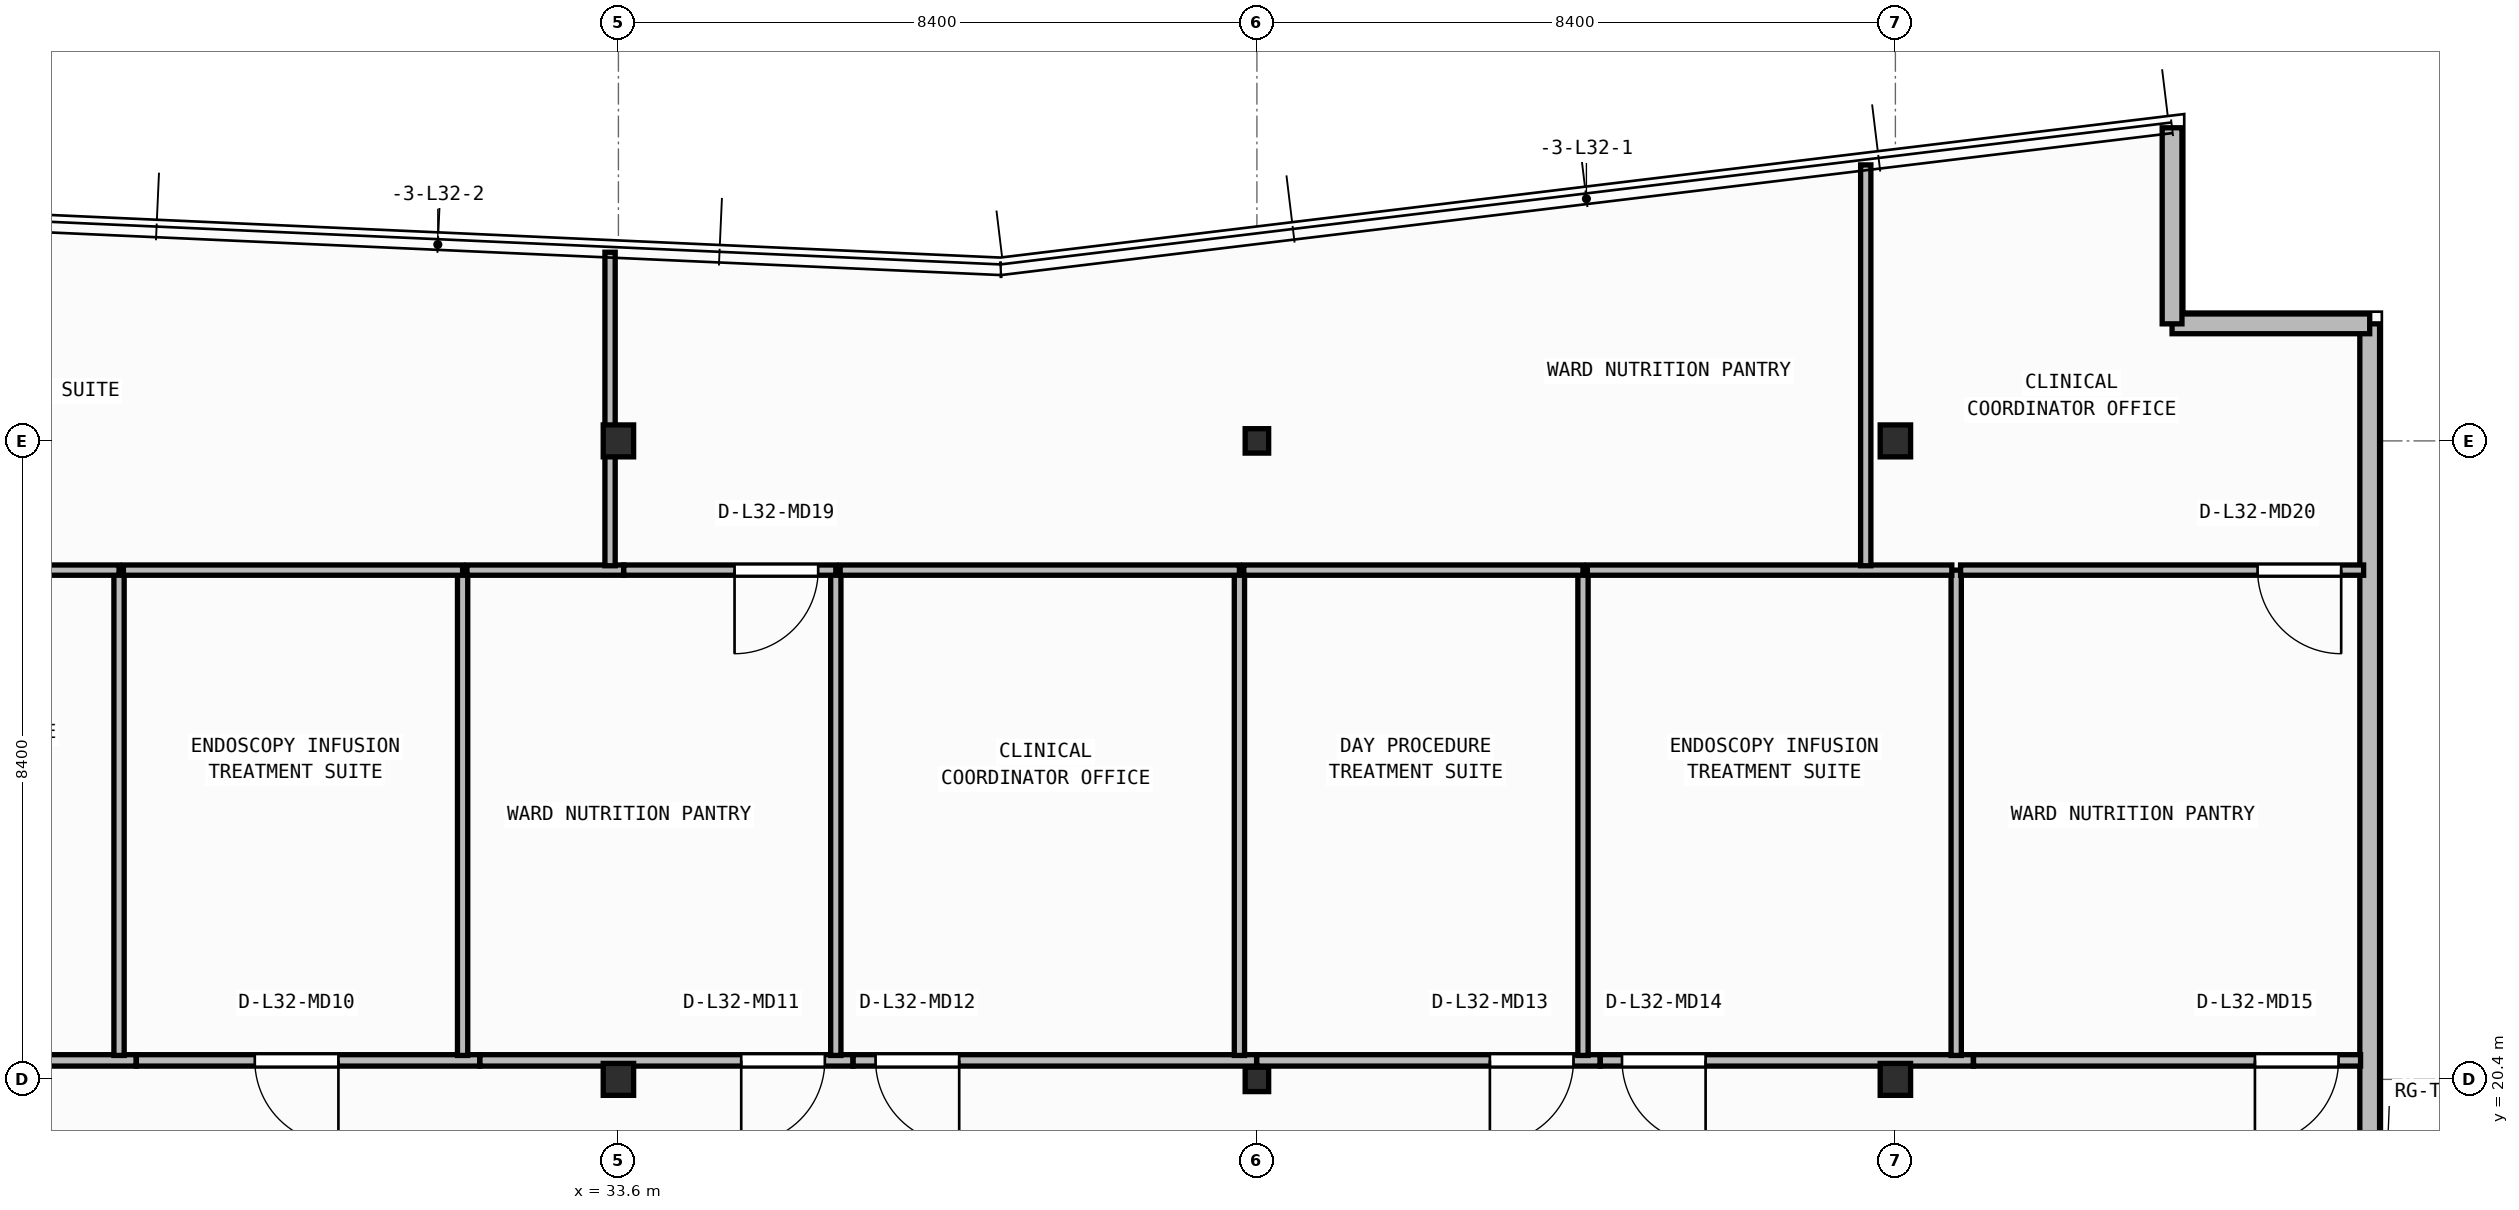
"""IFC4 building model, lengths in metres.
Left out: names, types, materials, properties, quantities, classifications, styles, units other than length and angle.
Written with IfcOpenShell. Run it as: python <this file> out.ifc"""

import sys

from ifc_helpers import new_model, si_unit, direction, frame, frame_2d, origin, origin_2d, place, context, subcontext, project, spatial, rectangle, i_section, extrude, element, fill, save


model = new_model("IFC4")
c1 = context("Model", 3, precision=1e-05, world=origin(), true_north=direction((0.0, 1.0)))
c2 = subcontext(c1, "Body", "Model", "MODEL_VIEW")
j1 = project(units=[si_unit("LENGTHUNIT", "METRE"), si_unit("PLANEANGLEUNIT", "RADIAN")], contexts=[c1])
p1 = place(None, origin())
s1 = spatial("IfcSite", under=j1, at=p1, CompositionType="ELEMENT")
p2 = place(p1, origin())
s2 = spatial("IfcBuilding", under=s1, at=p2, CompositionType="ELEMENT")
p3 = place(p2, frame((0.0, 0.0, 131.0)))
s3 = spatial("IfcBuildingStorey", under=s2, at=p3, CompositionType="ELEMENT", Elevation=131.0)
p4 = place(p3, frame((33.6, 20.4, 0.0), z_axis=(0.0, 0.0, 1.0), x_axis=(1.0, 0.0, 0.0)))
e1 = element("IfcColumn", 1, at=p4, inside=s3, PredefinedType="COLUMN", context=c2, shape_type="SweptSolid", body=[
    extrude(i_section(OverallWidth=0.4, OverallDepth=0.42, WebThickness=0.025, FlangeThickness=0.04, at=origin_2d()), origin(), (0.0, 0.0, 1.0), 3.95),
])
p5 = place(p3, frame((42.0, 20.4, 0.0), z_axis=(0.0, 0.0, 1.0), x_axis=(1.0, 0.0, 0.0)))
e2 = element("IfcColumn", 2, at=p5, inside=s3, PredefinedType="COLUMN", context=c2, shape_type="SweptSolid", body=[
    extrude(i_section(OverallWidth=0.309, OverallDepth=0.321, WebThickness=0.014, FlangeThickness=0.022, FilletRadius=0.017, at=origin_2d()), origin(), (0.0, 0.0, 1.0), 3.95),
])
for number, where, z_axis, x_axis in (
    (3, (50.4, 20.4, 0.0), (0.0, 0.0, 1.0), (1.0, 0.0, 0.0)),
    (4, (33.6, 28.8, 0.0), (0.0, 0.0, 1.0), (1.0, 0.0, 0.0)),
):
    element("IfcColumn", number, at=place(p3, frame(where, z_axis=z_axis, x_axis=x_axis)), inside=s3, PredefinedType="COLUMN", context=c2, shape_type="SweptSolid", body=[
        extrude(i_section(OverallWidth=0.4, OverallDepth=0.42, WebThickness=0.025, FlangeThickness=0.04, at=origin_2d()), origin(), (0.0, 0.0, 1.0), 3.95),
    ])
p6 = place(p3, frame((42.0, 28.8, 0.0), z_axis=(0.0, 0.0, 1.0), x_axis=(1.0, 0.0, 0.0)))
e5 = element("IfcColumn", 5, at=p6, inside=s3, PredefinedType="COLUMN", context=c2, shape_type="SweptSolid", body=[
    extrude(i_section(OverallWidth=0.309, OverallDepth=0.321, WebThickness=0.014, FlangeThickness=0.022, FilletRadius=0.017, at=origin_2d()), origin(), (0.0, 0.0, 1.0), 3.95),
])
p7 = place(p3, frame((50.4, 28.8, 0.0), z_axis=(0.0, 0.0, 1.0), x_axis=(1.0, 0.0, 0.0)))
e6 = element("IfcColumn", 6, at=p7, inside=s3, PredefinedType="COLUMN", context=c2, shape_type="SweptSolid", body=[
    extrude(i_section(OverallWidth=0.4, OverallDepth=0.42, WebThickness=0.025, FlangeThickness=0.04, at=origin_2d()), origin(), (0.0, 0.0, 1.0), 3.95),
])
p8 = place(p3, frame((56.64, 6.86, 0.0), z_axis=(0.0, 0.0, 1.0), x_axis=(0.0, 1.0, 0.0)))
e7 = element("IfcWall", 7, at=p8, inside=s3, PredefinedType="STANDARD", context=c2, shape_type="SweptSolid", body=[
    extrude(rectangle(XDim=23.48, YDim=0.26, at=frame_2d((11.74, 0.0))), origin(), (0.0, 0.0, 1.0), 3.71),
])
p9 = place(p8, frame((9.24, 0.0, 0.0)))
e8 = element("IfcOpeningElement", 8, at=p9, cuts=e7, PredefinedType="OPENING", context=c2, shape_type="SweptSolid", body=[
    extrude(rectangle(XDim=1.3, YDim=2.15, at=frame_2d((0.65, 1.075))), frame((0.0, 0.14, 0.0), z_axis=(0.0, -1.0, 0.0), x_axis=(1.0, 0.0, 0.0)), (0.0, 0.0, 1.0), 0.28),
])
p10 = place(p3, frame((56.64, 30.34, 0.0), z_axis=(0.0, 0.0, 1.0), x_axis=(-1.0, 0.0, 0.0)))
e9 = element("IfcWall", 9, at=p10, inside=s3, PredefinedType="STANDARD", context=c2, shape_type="SweptSolid", body=[
    extrude(rectangle(XDim=2.6, YDim=0.26, at=frame_2d((1.3, 0.0))), origin(), (0.0, 0.0, 1.0), 3.71),
])
p11 = place(p3, frame((54.04, 30.34, 0.0), z_axis=(0.0, 0.0, 1.0), x_axis=(0.0, 1.0, 0.0)))
e10 = element("IfcWall", 10, at=p11, inside=s3, PredefinedType="STANDARD", context=c2, shape_type="SweptSolid", body=[
    extrude(rectangle(XDim=2.579, YDim=0.26, at=frame_2d((1.29, 0.0))), origin(), (0.0, 0.0, 1.0), 3.71),
])
p12 = place(p3, frame((27.256, 20.65, 0.0), z_axis=(0.0, 0.0, 1.0), x_axis=(-1.0, 0.0, 0.0)))
e11 = element("IfcWall", 11, at=p12, inside=s3, PredefinedType="PARTITIONING", context=c2, shape_type="SweptSolid", body=[
    extrude(rectangle(XDim=5.536, YDim=0.15, at=frame_2d((2.768, 0.0))), origin(), (0.0, 0.0, 1.0), 3.083),
])
p13 = place(p3, frame((31.776, 20.65, 0.0), z_axis=(0.0, 0.0, 1.0), x_axis=(-1.0, 0.0, 0.0)))
e12 = element("IfcWall", 12, at=p13, inside=s3, PredefinedType="PARTITIONING", context=c2, shape_type="SweptSolid", body=[
    extrude(rectangle(XDim=4.518, YDim=0.15, at=frame_2d((2.259, 0.0))), origin(), (0.0, 0.0, 1.0), 3.083),
])
p14 = place(p13, frame((1.86, 0.0, 0.0)))
e13 = element("IfcOpeningElement", 13, at=p14, cuts=e12, PredefinedType="OPENING", context=c2, shape_type="SweptSolid", body=[
    extrude(rectangle(XDim=1.1, YDim=2.1, at=frame_2d((0.55, 1.05))), frame((0.0, 0.085, 0.0), z_axis=(0.0, -1.0, 0.0), x_axis=(1.0, 0.0, 0.0)), (0.0, 0.0, 1.0), 0.17),
])
p15 = place(p3, frame((36.686, 20.65, 0.0), z_axis=(0.0, 0.0, 1.0), x_axis=(-1.0, 0.0, 0.0)))
e14 = element("IfcWall", 14, at=p15, inside=s3, PredefinedType="PARTITIONING", context=c2, shape_type="SweptSolid", body=[
    extrude(rectangle(XDim=4.908, YDim=0.15, at=frame_2d((2.454, 0.0))), origin(), (0.0, 0.0, 1.0), 3.083),
])
p16 = place(p15, frame((0.37, 0.0, 0.0)))
e15 = element("IfcOpeningElement", 15, at=p16, cuts=e14, PredefinedType="OPENING", context=c2, shape_type="SweptSolid", body=[
    extrude(rectangle(XDim=1.1, YDim=2.1, at=frame_2d((0.55, 1.05))), frame((0.0, 0.085, 0.0), z_axis=(0.0, -1.0, 0.0), x_axis=(1.0, 0.0, 0.0)), (0.0, 0.0, 1.0), 0.17),
])
p17 = place(p3, frame((41.996, 20.65, 0.0), z_axis=(0.0, 0.0, 1.0), x_axis=(-1.0, 0.0, 0.0)))
e16 = element("IfcWall", 16, at=p17, inside=s3, PredefinedType="PARTITIONING", context=c2, shape_type="SweptSolid", body=[
    extrude(rectangle(XDim=5.308, YDim=0.15, at=frame_2d((2.654, 0.0))), origin(), (0.0, 0.0, 1.0), 3.083),
])
p18 = place(p17, frame((3.913, 0.0, 0.0)))
e17 = element("IfcOpeningElement", 17, at=p18, cuts=e16, PredefinedType="OPENING", context=c2, shape_type="SweptSolid", body=[
    extrude(rectangle(XDim=1.1, YDim=2.1, at=frame_2d((0.55, 1.05))), frame((0.0, 0.085, 0.0), z_axis=(0.0, -1.0, 0.0), x_axis=(1.0, 0.0, 0.0)), (0.0, 0.0, 1.0), 0.17),
])
p19 = place(p3, frame((46.516, 20.65, 0.0), z_axis=(0.0, 0.0, 1.0), x_axis=(-1.0, 0.0, 0.0)))
e18 = element("IfcWall", 18, at=p19, inside=s3, PredefinedType="PARTITIONING", context=c2, shape_type="SweptSolid", body=[
    extrude(rectangle(XDim=4.518, YDim=0.15, at=frame_2d((2.259, 0.0))), origin(), (0.0, 0.0, 1.0), 3.083),
])
p20 = place(p19, frame((0.351, 0.0, 0.0)))
e19 = element("IfcOpeningElement", 19, at=p20, cuts=e18, PredefinedType="OPENING", context=c2, shape_type="SweptSolid", body=[
    extrude(rectangle(XDim=1.1, YDim=2.1, at=frame_2d((0.55, 1.05))), frame((0.0, 0.085, 0.0), z_axis=(0.0, -1.0, 0.0), x_axis=(1.0, 0.0, 0.0)), (0.0, 0.0, 1.0), 0.17),
])
p21 = place(p3, frame((51.426, 20.65, 0.0), z_axis=(0.0, 0.0, 1.0), x_axis=(-1.0, 0.0, 0.0)))
e20 = element("IfcWall", 20, at=p21, inside=s3, PredefinedType="PARTITIONING", context=c2, shape_type="SweptSolid", body=[
    extrude(rectangle(XDim=4.908, YDim=0.15, at=frame_2d((2.454, 0.0))), origin(), (0.0, 0.0, 1.0), 3.083),
])
p22 = place(p21, frame((3.523, 0.0, 0.0)))
e21 = element("IfcOpeningElement", 21, at=p22, cuts=e20, PredefinedType="OPENING", context=c2, shape_type="SweptSolid", body=[
    extrude(rectangle(XDim=1.1, YDim=2.1, at=frame_2d((0.55, 1.05))), frame((0.0, 0.085, 0.0), z_axis=(0.0, -1.0, 0.0), x_axis=(1.0, 0.0, 0.0)), (0.0, 0.0, 1.0), 0.17),
])
p23 = place(p3, frame((56.52, 20.65, 0.0), z_axis=(0.0, 0.0, 1.0), x_axis=(-1.0, 0.0, 0.0)))
e22 = element("IfcWall", 22, at=p23, inside=s3, PredefinedType="PARTITIONING", context=c2, shape_type="SweptSolid", body=[
    extrude(rectangle(XDim=5.092, YDim=0.15, at=frame_2d((2.546, 0.0))), origin(), (0.0, 0.0, 1.0), 3.71),
])
p24 = place(p23, frame((0.29, 0.0, 0.0)))
e23 = element("IfcOpeningElement", 23, at=p24, cuts=e22, PredefinedType="OPENING", context=c2, shape_type="SweptSolid", body=[
    extrude(rectangle(XDim=1.1, YDim=2.1, at=frame_2d((0.55, 1.05))), frame((0.0, 0.085, 0.0), z_axis=(0.0, -1.0, 0.0), x_axis=(1.0, 0.0, 0.0)), (0.0, 0.0, 1.0), 0.17),
])
p25 = place(p3, frame((27.03, 20.715, 0.0), z_axis=(0.0, 0.0, 1.0), x_axis=(0.0, 1.0, 0.0)))
e24 = element("IfcWall", 24, at=p25, inside=s3, PredefinedType="PARTITIONING", context=c2, shape_type="SweptSolid", body=[
    extrude(rectangle(XDim=6.385, YDim=0.135, at=frame_2d((3.192, 0.0))), origin(), (0.0, 0.0, 1.0), 3.71),
])
p26 = place(p3, frame((27.03, 27.1, 0.0), z_axis=(0.0, 0.0, 1.0), x_axis=(-1.0, 0.0, 0.0)))
e25 = element("IfcWall", 25, at=p26, inside=s3, PredefinedType="PARTITIONING", context=c2, shape_type="SweptSolid", body=[
    extrude(rectangle(XDim=5.265, YDim=0.135, at=frame_2d((2.633, 0.0))), origin(), (0.0, 0.0, 1.0), 3.71),
])
p27 = place(p3, frame((31.55, 20.715, 0.0), z_axis=(0.0, 0.0, 1.0), x_axis=(0.0, 1.0, 0.0)))
e26 = element("IfcWall", 26, at=p27, inside=s3, PredefinedType="PARTITIONING", context=c2, shape_type="SweptSolid", body=[
    extrude(rectangle(XDim=6.385, YDim=0.135, at=frame_2d((3.192, 0.0))), origin(), (0.0, 0.0, 1.0), 3.71),
])
p28 = place(p3, frame((31.55, 27.1, 0.0), z_axis=(0.0, 0.0, 1.0), x_axis=(-1.0, 0.0, 0.0)))
e27 = element("IfcWall", 27, at=p28, inside=s3, PredefinedType="PARTITIONING", context=c2, shape_type="SweptSolid", body=[
    extrude(rectangle(XDim=4.463, YDim=0.135, at=frame_2d((2.231, 0.0))), origin(), (0.0, 0.0, 1.0), 3.71),
])
p29 = place(p3, frame((36.46, 20.715, 0.0), z_axis=(0.0, 0.0, 1.0), x_axis=(0.0, 1.0, 0.0)))
e28 = element("IfcWall", 28, at=p29, inside=s3, PredefinedType="PARTITIONING", context=c2, shape_type="SweptSolid", body=[
    extrude(rectangle(XDim=6.385, YDim=0.135, at=frame_2d((3.192, 0.0))), origin(), (0.0, 0.0, 1.0), 3.71),
])
p30 = place(p3, frame((33.668, 27.1, 0.0), z_axis=(0.0, 0.0, 1.0), x_axis=(-1.0, 0.0, 0.0)))
e29 = element("IfcWall", 29, at=p30, inside=s3, PredefinedType="PARTITIONING", context=c2, shape_type="SweptSolid", body=[
    extrude(rectangle(XDim=2.061, YDim=0.135, at=frame_2d((1.031, 0.0))), origin(), (0.0, 0.0, 1.0), 3.71),
])
p31 = place(p3, frame((36.46, 27.1, 0.0), z_axis=(0.0, 0.0, 1.0), x_axis=(-1.0, 0.0, 0.0)))
e30 = element("IfcWall", 30, at=p31, inside=s3, PredefinedType="PARTITIONING", context=c2, shape_type="SweptSolid", body=[
    extrude(rectangle(XDim=2.79, YDim=0.135, at=frame_2d((1.395, 0.0))), origin(), (0.0, 0.0, 1.0), 3.71),
])
p32 = place(p31, frame((0.232, 0.0, 0.0)))
e31 = element("IfcOpeningElement", 31, at=p32, cuts=e30, PredefinedType="OPENING", context=c2, shape_type="SweptSolid", body=[
    extrude(rectangle(XDim=1.1, YDim=2.1, at=frame_2d((0.55, 1.05))), frame((0.0, 0.077, 0.0), z_axis=(0.0, -1.0, 0.0), x_axis=(1.0, 0.0, 0.0)), (0.0, 0.0, 1.0), 0.155),
])
p33 = place(p3, frame((41.77, 20.715, 0.0), z_axis=(0.0, 0.0, 1.0), x_axis=(0.0, 1.0, 0.0)))
e32 = element("IfcWall", 32, at=p33, inside=s3, PredefinedType="PARTITIONING", context=c2, shape_type="SweptSolid", body=[
    extrude(rectangle(XDim=6.385, YDim=0.135, at=frame_2d((3.192, 0.0))), origin(), (0.0, 0.0, 1.0), 3.152),
])
p34 = place(p3, frame((41.77, 27.1, 0.0), z_axis=(0.0, 0.0, 1.0), x_axis=(-1.0, 0.0, 0.0)))
e33 = element("IfcWall", 33, at=p34, inside=s3, PredefinedType="PARTITIONING", context=c2, shape_type="SweptSolid", body=[
    extrude(rectangle(XDim=5.252, YDim=0.135, at=frame_2d((2.626, 0.0))), origin(), (0.0, 0.0, 1.0), 3.71),
])
p35 = place(p3, frame((46.29, 20.715, 0.0), z_axis=(0.0, 0.0, 1.0), x_axis=(0.0, 1.0, 0.0)))
e34 = element("IfcWall", 34, at=p35, inside=s3, PredefinedType="PARTITIONING", context=c2, shape_type="SweptSolid", body=[
    extrude(rectangle(XDim=6.385, YDim=0.135, at=frame_2d((3.192, 0.0))), origin(), (0.0, 0.0, 1.0), 3.71),
])
p36 = place(p3, frame((46.29, 27.1, 0.0), z_axis=(0.0, 0.0, 1.0), x_axis=(-1.0, 0.0, 0.0)))
e35 = element("IfcWall", 35, at=p36, inside=s3, PredefinedType="PARTITIONING", context=c2, shape_type="SweptSolid", body=[
    extrude(rectangle(XDim=4.463, YDim=0.135, at=frame_2d((2.231, 0.0))), origin(), (0.0, 0.0, 1.0), 3.71),
])
p37 = place(p3, frame((51.2, 20.715, 0.0), z_axis=(0.0, 0.0, 1.0), x_axis=(0.0, 1.0, 0.0)))
e36 = element("IfcWall", 36, at=p37, inside=s3, PredefinedType="PARTITIONING", context=c2, shape_type="SweptSolid", body=[
    extrude(rectangle(XDim=6.385, YDim=0.135, at=frame_2d((3.192, 0.0))), origin(), (0.0, 0.0, 1.0), 3.71),
])
p38 = place(p3, frame((51.143, 27.1, 0.0), z_axis=(0.0, 0.0, 1.0), x_axis=(-1.0, 0.0, 0.0)))
e37 = element("IfcWall", 37, at=p38, inside=s3, PredefinedType="PARTITIONING", context=c2, shape_type="SweptSolid", body=[
    extrude(rectangle(XDim=4.795, YDim=0.135, at=frame_2d((2.397, 0.0))), origin(), (0.0, 0.0, 1.0), 3.71),
])
p39 = place(p3, frame((56.56, 27.1, 0.0), z_axis=(0.0, 0.0, 1.0), x_axis=(-1.0, 0.0, 0.0)))
e38 = element("IfcWall", 38, at=p39, inside=s3, PredefinedType="PARTITIONING", context=c2, shape_type="SweptSolid", body=[
    extrude(rectangle(XDim=5.302, YDim=0.135, at=frame_2d((2.651, 0.0))), origin(), (0.0, 0.0, 1.0), 3.71),
])
p40 = place(p39, frame((0.295, 0.0, 0.0)))
e39 = element("IfcOpeningElement", 39, at=p40, cuts=e38, PredefinedType="OPENING", context=c2, shape_type="SweptSolid", body=[
    extrude(rectangle(XDim=1.1, YDim=2.1, at=frame_2d((0.55, 1.05))), frame((0.0, 0.077, 0.0), z_axis=(0.0, -1.0, 0.0), x_axis=(1.0, 0.0, 0.0)), (0.0, 0.0, 1.0), 0.155),
])
p41 = place(p3, frame((33.49, 27.157, 0.0), z_axis=(0.0, 0.0, 1.0), x_axis=(0.0, 1.0, 0.0)))
e40 = element("IfcWall", 40, at=p41, inside=s3, PredefinedType="PARTITIONING", context=c2, shape_type="SweptSolid", body=[
    extrude(rectangle(XDim=4.125, YDim=0.135, at=frame_2d((2.062, 0.0))), origin(), (0.0, 0.0, 1.0), 3.152),
])
p42 = place(p3, frame((50.01, 27.157, 0.0), z_axis=(0.0, 0.0, 1.0), x_axis=(0.0, 1.0, 0.0)))
e41 = element("IfcWall", 41, at=p42, inside=s3, PredefinedType="PARTITIONING", context=c2, shape_type="SweptSolid", body=[
    extrude(rectangle(XDim=5.273, YDim=0.135, at=frame_2d((2.637, 0.0))), origin(), (0.0, 0.0, 1.0), 3.152),
])
p43 = place(p14, origin())
e42 = element("IfcDoor", 42, at=p43, inside=s3, OperationType="SINGLE_SWING_LEFT", PredefinedType="DOOR", context=c2, shape_type="SweptSolid", body=[
    extrude(rectangle(XDim=1.1, YDim=2.1, at=frame_2d((0.55, 1.05))), frame((0.0, 0.025, 0.0), z_axis=(0.0, -1.0, 0.0), x_axis=(1.0, 0.0, 0.0)), (0.0, 0.0, 1.0), 0.05),
])
fill(e13, e42)
p44 = place(p16, origin())
e43 = element("IfcDoor", 43, at=p44, inside=s3, OperationType="SINGLE_SWING_RIGHT", PredefinedType="DOOR", context=c2, shape_type="SweptSolid", body=[
    extrude(rectangle(XDim=1.1, YDim=2.1, at=frame_2d((0.55, 1.05))), frame((0.0, 0.025, 0.0), z_axis=(0.0, -1.0, 0.0), x_axis=(1.0, 0.0, 0.0)), (0.0, 0.0, 1.0), 0.05),
])
fill(e15, e43)
p45 = place(p18, origin())
e44 = element("IfcDoor", 44, at=p45, inside=s3, OperationType="SINGLE_SWING_LEFT", PredefinedType="DOOR", context=c2, shape_type="SweptSolid", body=[
    extrude(rectangle(XDim=1.1, YDim=2.1, at=frame_2d((0.55, 1.05))), frame((0.0, 0.025, 0.0), z_axis=(0.0, -1.0, 0.0), x_axis=(1.0, 0.0, 0.0)), (0.0, 0.0, 1.0), 0.05),
])
fill(e17, e44)
p46 = place(p20, origin())
e45 = element("IfcDoor", 45, at=p46, inside=s3, OperationType="SINGLE_SWING_RIGHT", PredefinedType="DOOR", context=c2, shape_type="SweptSolid", body=[
    extrude(rectangle(XDim=1.1, YDim=2.1, at=frame_2d((0.55, 1.05))), frame((0.0, 0.025, 0.0), z_axis=(0.0, -1.0, 0.0), x_axis=(1.0, 0.0, 0.0)), (0.0, 0.0, 1.0), 0.05),
])
fill(e19, e45)
p47 = place(p22, origin())
e46 = element("IfcDoor", 46, at=p47, inside=s3, OperationType="SINGLE_SWING_LEFT", PredefinedType="DOOR", context=c2, shape_type="SweptSolid", body=[
    extrude(rectangle(XDim=1.1, YDim=2.1, at=frame_2d((0.55, 1.05))), frame((0.0, 0.025, 0.0), z_axis=(0.0, -1.0, 0.0), x_axis=(1.0, 0.0, 0.0)), (0.0, 0.0, 1.0), 0.05),
])
fill(e21, e46)
p48 = place(p24, origin())
e47 = element("IfcDoor", 47, at=p48, inside=s3, OperationType="SINGLE_SWING_RIGHT", PredefinedType="DOOR", context=c2, shape_type="SweptSolid", body=[
    extrude(rectangle(XDim=1.1, YDim=2.1, at=frame_2d((0.55, 1.05))), frame((0.0, 0.025, 0.0), z_axis=(0.0, -1.0, 0.0), x_axis=(1.0, 0.0, 0.0)), (0.0, 0.0, 1.0), 0.05),
])
fill(e23, e47)
p49 = place(p32, origin())
e48 = element("IfcDoor", 48, at=p49, inside=s3, OperationType="SINGLE_SWING_RIGHT", PredefinedType="DOOR", context=c2, shape_type="SweptSolid", body=[
    extrude(rectangle(XDim=1.1, YDim=2.1, at=frame_2d((0.55, 1.05))), frame((0.0, 0.025, 0.0), z_axis=(0.0, -1.0, 0.0), x_axis=(1.0, 0.0, 0.0)), (0.0, 0.0, 1.0), 0.05),
])
fill(e31, e48)
p50 = place(p40, origin())
e49 = element("IfcDoor", 49, at=p50, inside=s3, OperationType="SINGLE_SWING_LEFT", PredefinedType="DOOR", context=c2, shape_type="SweptSolid", body=[
    extrude(rectangle(XDim=1.1, YDim=2.1, at=frame_2d((0.55, 1.05))), frame((0.0, 0.025, 0.0), z_axis=(0.0, -1.0, 0.0), x_axis=(1.0, 0.0, 0.0)), (0.0, 0.0, 1.0), 0.05),
])
fill(e39, e49)
save(model, sys.argv[1])
